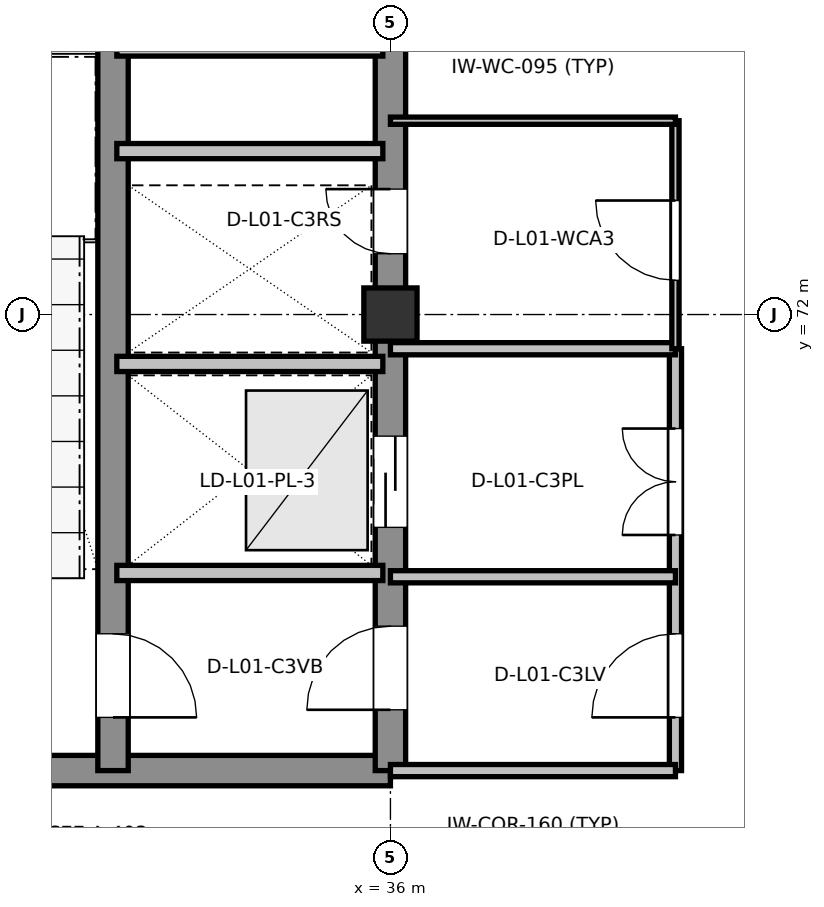
"""IFC4 building model, lengths in metres.
Left out: names, types, materials, properties, quantities, classifications, styles, units other than length and angle.
Written with IfcOpenShell. Run it as: python <this file> out.ifc"""

import sys

from ifc_helpers import new_model, si_unit, direction, frame, frame_2d, origin, origin_2d, place, context, subcontext, project, spatial, rectangle, extrude, element, fill, save


model = new_model("IFC4")
c1 = context("Model", 3, precision=1e-05, world=origin(), true_north=direction((0.0, 1.0)))
c2 = subcontext(c1, "Body", "Model", "MODEL_VIEW")
j1 = project(units=[si_unit("LENGTHUNIT", "METRE"), si_unit("PLANEANGLEUNIT", "RADIAN")], contexts=[c1])
p1 = place(None, origin())
s1 = spatial("IfcSite", under=j1, at=p1, CompositionType="ELEMENT")
p2 = place(p1, origin())
s2 = spatial("IfcBuilding", under=s1, at=p2, CompositionType="ELEMENT")
p3 = place(p2, frame((0.0, 0.0, 5.4)))
s3 = spatial("IfcBuildingStorey", under=s2, at=p3, CompositionType="ELEMENT", Elevation=5.4)
p4 = place(p3, frame((36.0, 72.0, 0.0), z_axis=(0.0, 0.0, 1.0), x_axis=(1.0, 0.0, 0.0)))
e1 = element("IfcColumn", 1, at=p4, inside=s3, PredefinedType="COLUMN", context=c2, shape_type="SweptSolid", body=[
    extrude(rectangle(XDim=0.7, YDim=0.7, at=origin_2d()), origin(), (0.0, 0.0, 1.0), 4.8),
])
p5 = place(p3, frame((27.0, 66.0, 0.0), z_axis=(0.0, 0.0, 1.0), x_axis=(1.0, 0.0, 0.0)))
e2 = element("IfcWall", 2, at=p5, inside=s3, PredefinedType="SHEAR", context=c2, shape_type="SweptSolid", body=[
    extrude(rectangle(XDim=9.0, YDim=0.4, at=frame_2d((4.5, 0.0))), origin(), (0.0, 0.0, 1.0), 4.56),
])
p6 = place(p3, frame((36.0, 66.0, 0.0), z_axis=(0.0, 0.0, 1.0), x_axis=(0.0, 1.0, 0.0)))
e3 = element("IfcWall", 3, at=p6, inside=s3, PredefinedType="SHEAR", context=c2, shape_type="SweptSolid", body=[
    extrude(rectangle(XDim=18.0, YDim=0.4, at=frame_2d((9.0, 0.0))), origin(), (0.0, 0.0, 1.0), 4.56),
])
p7 = place(p6, frame((0.8, 0.0, 0.0)))
e4 = element("IfcOpeningElement", 4, at=p7, cuts=e3, PredefinedType="OPENING", context=c2, shape_type="SweptSolid", body=[
    extrude(rectangle(XDim=1.1, YDim=2.16, at=frame_2d((0.55, 1.08))), frame((0.0, 0.21, 0.0), z_axis=(0.0, -1.0, 0.0), x_axis=(1.0, 0.0, 0.0)), (0.0, 0.0, 1.0), 0.42),
])
p8 = place(p6, frame((3.2, 0.0, 0.0)))
e5 = element("IfcOpeningElement", 5, at=p8, cuts=e3, PredefinedType="OPENING", context=c2, shape_type="SweptSolid", body=[
    extrude(rectangle(XDim=1.2, YDim=2.2, at=frame_2d((0.6, 1.1))), frame((0.0, 0.21, 0.0), z_axis=(0.0, -1.0, 0.0), x_axis=(1.0, 0.0, 0.0)), (0.0, 0.0, 1.0), 0.42),
])
p9 = place(p6, frame((6.8, 0.0, 0.0)))
e6 = element("IfcOpeningElement", 6, at=p9, cuts=e3, PredefinedType="OPENING", context=c2, shape_type="SweptSolid", body=[
    extrude(rectangle(XDim=0.85, YDim=2.1, at=frame_2d((0.425, 1.05))), frame((0.0, 0.21, 0.0), z_axis=(0.0, -1.0, 0.0), x_axis=(1.0, 0.0, 0.0)), (0.0, 0.0, 1.0), 0.42),
])
p10 = place(p3, frame((32.35, 66.0, 0.0), z_axis=(0.0, 0.0, 1.0), x_axis=(0.0, 1.0, 0.0)))
e7 = element("IfcWall", 7, at=p10, inside=s3, PredefinedType="SHEAR", context=c2, shape_type="SweptSolid", body=[
    extrude(rectangle(XDim=18.0, YDim=0.4, at=frame_2d((9.0, 0.0))), origin(), (0.0, 0.0, 1.0), 4.56),
])
p11 = place(p10, frame((0.7, 0.0, 0.0)))
e8 = element("IfcOpeningElement", 8, at=p11, cuts=e7, PredefinedType="OPENING", context=c2, shape_type="SweptSolid", body=[
    extrude(rectangle(XDim=1.1, YDim=2.16, at=frame_2d((0.55, 1.08))), frame((0.0, 0.21, 0.0), z_axis=(0.0, -1.0, 0.0), x_axis=(1.0, 0.0, 0.0)), (0.0, 0.0, 1.0), 0.42),
])
for number, where, z_axis, x_axis in (
    (9, (32.4, 68.6, 0.0), (0.0, 0.0, 1.0), (1.0, 0.0, 0.0)),
    (10, (32.4, 71.35, 0.0), (0.0, 0.0, 1.0), (1.0, 0.0, 0.0)),
    (11, (32.4, 74.15, 0.0), (0.0, 0.0, 1.0), (1.0, 0.0, 0.0)),
    (12, (32.4, 75.5, 0.0), (0.0, 0.0, 1.0), (1.0, 0.0, 0.0)),
):
    element("IfcWall", number, at=place(p3, frame(where, z_axis=z_axis, x_axis=x_axis)), inside=s3, PredefinedType="PARTITIONING", context=c2, shape_type="SweptSolid", body=[
        extrude(rectangle(XDim=3.5, YDim=0.2, at=frame_2d((1.75, 0.0))), origin(), (0.0, 0.0, 1.0), 4.56),
    ])
p12 = place(p3, frame((39.75, 66.0, 0.0), z_axis=(0.0, 0.0, 1.0), x_axis=(0.0, 1.0, 0.0)))
e13 = element("IfcWall", 13, at=p12, inside=s3, PredefinedType="PARTITIONING", context=c2, shape_type="SweptSolid", body=[
    extrude(rectangle(XDim=5.55, YDim=0.16, at=frame_2d((2.775, 0.0))), origin(), (0.0, 0.0, 1.0), 4.56),
])
p13 = place(p12, frame((0.7, 0.0, 0.0)))
e14 = element("IfcOpeningElement", 14, at=p13, cuts=e13, PredefinedType="OPENING", context=c2, shape_type="SweptSolid", body=[
    extrude(rectangle(XDim=1.1, YDim=2.16, at=frame_2d((0.55, 1.08))), frame((0.0, 0.09, 0.0), z_axis=(0.0, -1.0, 0.0), x_axis=(1.0, 0.0, 0.0)), (0.0, 0.0, 1.0), 0.18),
])
p14 = place(p12, frame((3.1, 0.0, 0.0)))
e15 = element("IfcOpeningElement", 15, at=p14, cuts=e13, PredefinedType="OPENING", context=c2, shape_type="SweptSolid", body=[
    extrude(rectangle(XDim=1.4, YDim=2.2, at=frame_2d((0.7, 1.1))), frame((0.0, 0.09, 0.0), z_axis=(0.0, -1.0, 0.0), x_axis=(1.0, 0.0, 0.0)), (0.0, 0.0, 1.0), 0.18),
])
p15 = place(p3, frame((36.0, 66.0, 0.0), z_axis=(0.0, 0.0, 1.0), x_axis=(1.0, 0.0, 0.0)))
e16 = element("IfcWall", 16, at=p15, inside=s3, PredefinedType="PARTITIONING", context=c2, shape_type="SweptSolid", body=[
    extrude(rectangle(XDim=3.75, YDim=0.16, at=frame_2d((1.875, 0.0))), origin(), (0.0, 0.0, 1.0), 4.185),
])
for number, where, z_axis, x_axis in (
    (17, (36.0, 68.55, 0.0), (0.0, 0.0, 1.0), (1.0, 0.0, 0.0)),
    (18, (36.0, 71.55, 0.0), (0.0, 0.0, 1.0), (1.0, 0.0, 0.0)),
):
    element("IfcWall", number, at=place(p3, frame(where, z_axis=z_axis, x_axis=x_axis)), inside=s3, PredefinedType="PARTITIONING", context=c2, shape_type="SweptSolid", body=[
        extrude(rectangle(XDim=3.75, YDim=0.16, at=frame_2d((1.875, 0.0))), origin(), (0.0, 0.0, 1.0), 4.56),
    ])
p16 = place(p3, frame((39.75, 71.55, 0.0), z_axis=(0.0, 0.0, 1.0), x_axis=(0.0, 1.0, 0.0)))
e19 = element("IfcWall", 19, at=p16, inside=s3, PredefinedType="PARTITIONING", context=c2, shape_type="SweptSolid", body=[
    extrude(rectangle(XDim=3.0, YDim=0.095, at=frame_2d((1.5, 0.0))), origin(), (0.0, 0.0, 1.0), 4.56),
])
p17 = place(p16, frame((0.9, 0.0, 0.0)))
e20 = element("IfcOpeningElement", 20, at=p17, cuts=e19, PredefinedType="OPENING", context=c2, shape_type="SweptSolid", body=[
    extrude(rectangle(XDim=1.05, YDim=2.13, at=frame_2d((0.525, 1.065))), frame((0.0, 0.057, 0.0), z_axis=(0.0, -1.0, 0.0), x_axis=(1.0, 0.0, 0.0)), (0.0, 0.0, 1.0), 0.115),
])
p18 = place(p3, frame((36.0, 74.55, 0.0), z_axis=(0.0, 0.0, 1.0), x_axis=(1.0, 0.0, 0.0)))
e21 = element("IfcWall", 21, at=p18, inside=s3, PredefinedType="PARTITIONING", context=c2, shape_type="SweptSolid", body=[
    extrude(rectangle(XDim=3.75, YDim=0.095, at=frame_2d((1.875, 0.0))), origin(), (0.0, 0.0, 1.0), 4.56),
])
p19 = place(p11, frame((1.1, 0.0, 0.0), z_axis=(0.0, 0.0, 1.0), x_axis=(-1.0, 0.0, 0.0)))
e22 = element("IfcDoor", 22, at=p19, inside=s3, OperationType="SINGLE_SWING_RIGHT", PredefinedType="DOOR", context=c2, shape_type="SweptSolid", body=[
    extrude(rectangle(XDim=1.1, YDim=2.16, at=frame_2d((0.55, 1.08))), frame((0.0, 0.025, 0.0), z_axis=(0.0, -1.0, 0.0), x_axis=(1.0, 0.0, 0.0)), (0.0, 0.0, 1.0), 0.05),
])
fill(e8, e22)
p20 = place(p7, origin())
e23 = element("IfcDoor", 23, at=p20, inside=s3, OperationType="SINGLE_SWING_LEFT", PredefinedType="DOOR", context=c2, shape_type="SweptSolid", body=[
    extrude(rectangle(XDim=1.1, YDim=2.16, at=frame_2d((0.55, 1.08))), frame((0.0, 0.025, 0.0), z_axis=(0.0, -1.0, 0.0), x_axis=(1.0, 0.0, 0.0)), (0.0, 0.0, 1.0), 0.05),
])
fill(e4, e23)
p21 = place(p8, origin())
e24 = element("IfcDoor", 24, at=p21, inside=s3, OperationType="SLIDING_TO_LEFT", PredefinedType="DOOR", context=c2, shape_type="SweptSolid", body=[
    extrude(rectangle(XDim=1.2, YDim=2.2, at=frame_2d((0.6, 1.1))), frame((0.0, 0.025, 0.0), z_axis=(0.0, -1.0, 0.0), x_axis=(1.0, 0.0, 0.0)), (0.0, 0.0, 1.0), 0.05),
])
fill(e5, e24)
p22 = place(p9, origin())
e25 = element("IfcDoor", 25, at=p22, inside=s3, OperationType="SINGLE_SWING_RIGHT", PredefinedType="DOOR", context=c2, shape_type="SweptSolid", body=[
    extrude(rectangle(XDim=0.85, YDim=2.1, at=frame_2d((0.425, 1.05))), frame((0.0, 0.025, 0.0), z_axis=(0.0, -1.0, 0.0), x_axis=(1.0, 0.0, 0.0)), (0.0, 0.0, 1.0), 0.05),
])
fill(e6, e25)
p23 = place(p13, origin())
e26 = element("IfcDoor", 26, at=p23, inside=s3, OperationType="SINGLE_SWING_LEFT", PredefinedType="DOOR", context=c2, shape_type="SweptSolid", body=[
    extrude(rectangle(XDim=1.1, YDim=2.16, at=frame_2d((0.55, 1.08))), frame((0.0, 0.025, 0.0), z_axis=(0.0, -1.0, 0.0), x_axis=(1.0, 0.0, 0.0)), (0.0, 0.0, 1.0), 0.05),
])
fill(e14, e26)
p24 = place(p14, origin())
e27 = element("IfcDoor", 27, at=p24, inside=s3, OperationType="DOUBLE_DOOR_SINGLE_SWING", PredefinedType="DOOR", context=c2, shape_type="SweptSolid", body=[
    extrude(rectangle(XDim=1.4, YDim=2.2, at=frame_2d((0.7, 1.1))), frame((0.0, 0.025, 0.0), z_axis=(0.0, -1.0, 0.0), x_axis=(1.0, 0.0, 0.0)), (0.0, 0.0, 1.0), 0.05),
])
fill(e15, e27)
p25 = place(p17, origin())
e28 = element("IfcDoor", 28, at=p25, inside=s3, OperationType="SINGLE_SWING_RIGHT", PredefinedType="DOOR", context=c2, shape_type="SweptSolid", body=[
    extrude(rectangle(XDim=1.05, YDim=2.13, at=frame_2d((0.525, 1.065))), frame((0.0, 0.025, 0.0), z_axis=(0.0, -1.0, 0.0), x_axis=(1.0, 0.0, 0.0)), (0.0, 0.0, 1.0), 0.05),
])
fill(e20, e28)
save(model, sys.argv[1])
